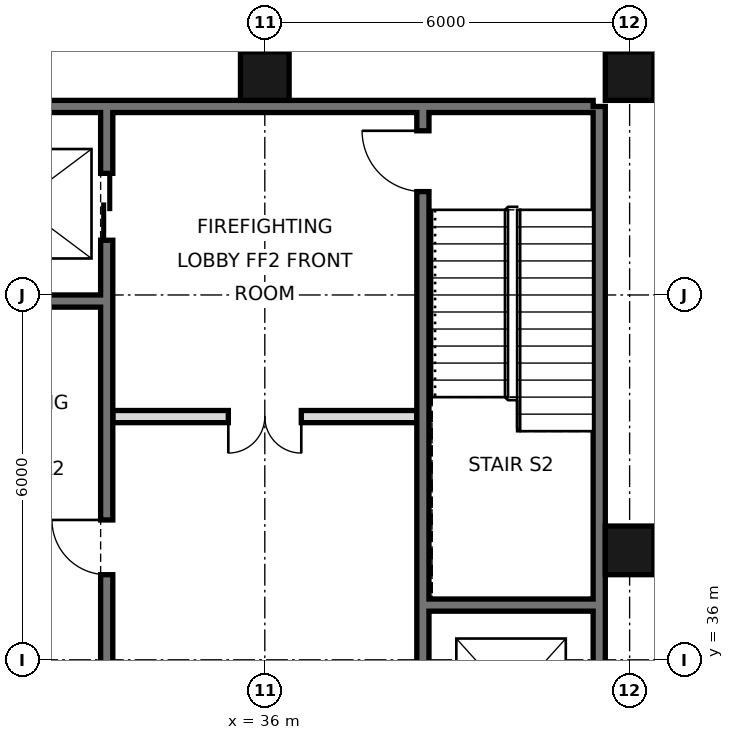
"""IFC4 building model, lengths in metres.
Left out: names, types, materials, properties, quantities, classifications, styles, units other than length and angle.
Written with IfcOpenShell. Run it as: python <this file> out.ifc"""

import sys

from ifc_helpers import new_model, si_unit, direction, frame, frame_2d, origin, origin_2d, place, context, subcontext, project, spatial, rectangle, hollow_rectangle, extrude, element, fill, save


model = new_model("IFC4")
c1 = context("Model", 3, precision=1e-05, world=origin(), true_north=direction((0.0, 1.0)))
c2 = subcontext(c1, "Body", "Model", "MODEL_VIEW")
j1 = project(units=[si_unit("LENGTHUNIT", "METRE"), si_unit("PLANEANGLEUNIT", "RADIAN")], contexts=[c1])
p1 = place(None, origin())
s1 = spatial("IfcSite", under=j1, at=p1, CompositionType="ELEMENT")
p2 = place(p1, origin())
s2 = spatial("IfcBuilding", under=s1, at=p2, CompositionType="ELEMENT")
p3 = place(p2, frame((0.0, 0.0, 229.8)))
s3 = spatial("IfcBuildingStorey", under=s2, at=p3, CompositionType="ELEMENT", Elevation=229.8)
for number, where, z_axis, x_axis in (
    (1, (36.0, 45.6, 0.0), (0.0, 0.0, 1.0), (1.0, 0.0, 0.0)),
    (2, (42.0, 37.8, 0.0), (0.0, 0.0, 1.0), (1.0, 0.0, 0.0)),
    (3, (42.0, 45.6, 0.0), (0.0, 0.0, 1.0), (1.0, 0.0, 0.0)),
):
    element("IfcColumn", number, at=place(p3, frame(where, z_axis=z_axis, x_axis=x_axis)), inside=s3, PredefinedType="COLUMN", context=c2, shape_type="SweptSolid", body=[
        extrude(hollow_rectangle(XDim=0.8, YDim=0.8, WallThickness=0.04, at=origin_2d()), origin(), (0.0, 0.0, 1.0), 4.4),
    ])
p4 = place(p3, frame((41.5, 21.6, 0.0), z_axis=(0.0, 0.0, 1.0), x_axis=(0.0, 1.0, 0.0)))
e4 = element("IfcWall", 4, at=p4, inside=s3, PredefinedType="SOLIDWALL", context=c2, shape_type="SweptSolid", body=[
    extrude(rectangle(XDim=23.5, YDim=0.2, at=frame_2d((11.75, 0.0))), origin(), (0.0, 0.0, 1.0), 4.1),
])
p5 = place(p3, frame((6.6, 45.1, 0.0), z_axis=(0.0, 0.0, 1.0), x_axis=(1.0, 0.0, 0.0)))
e5 = element("IfcWall", 5, at=p5, inside=s3, PredefinedType="SOLIDWALL", context=c2, shape_type="SweptSolid", body=[
    extrude(rectangle(XDim=34.8, YDim=0.2, at=frame_2d((17.4, 0.0))), origin(), (0.0, 0.0, 1.0), 4.1),
])
p6 = place(p3, frame((33.4, 27.5, 0.0), z_axis=(0.0, 0.0, 1.0), x_axis=(0.0, 1.0, 0.0)))
e6 = element("IfcWall", 6, at=p6, inside=s3, PredefinedType="SOLIDWALL", context=c2, shape_type="SweptSolid", body=[
    extrude(rectangle(XDim=17.5, YDim=0.2, at=frame_2d((8.75, 0.0))), origin(), (0.0, 0.0, 1.0), 4.1),
])
p7 = place(p6, frame((1.1, 0.0, 0.0)))
e7 = element("IfcOpeningElement", 7, at=p7, cuts=e6, PredefinedType="OPENING", context=c2, shape_type="SweptSolid", body=[
    extrude(rectangle(XDim=1.1, YDim=2.1, at=frame_2d((0.55, 1.05))), frame((0.0, 0.11, 0.0), z_axis=(0.0, -1.0, 0.0), x_axis=(1.0, 0.0, 0.0)), (0.0, 0.0, 1.0), 0.22),
])
p8 = place(p6, frame((4.2, 0.0, 0.0)))
e8 = element("IfcOpeningElement", 8, at=p8, cuts=e6, PredefinedType="OPENING", context=c2, shape_type="SweptSolid", body=[
    extrude(rectangle(XDim=1.1, YDim=2.1, at=frame_2d((0.55, 1.05))), frame((0.0, 0.11, 0.0), z_axis=(0.0, -1.0, 0.0), x_axis=(1.0, 0.0, 0.0)), (0.0, 0.0, 1.0), 0.22),
])
p9 = place(p6, frame((15.4, 0.0, 0.0)))
e9 = element("IfcOpeningElement", 9, at=p9, cuts=e6, PredefinedType="OPENING", context=c2, shape_type="SweptSolid", body=[
    extrude(rectangle(XDim=1.1, YDim=2.1, at=frame_2d((0.55, 1.05))), frame((0.0, 0.11, 0.0), z_axis=(0.0, -1.0, 0.0), x_axis=(1.0, 0.0, 0.0)), (0.0, 0.0, 1.0), 0.22),
])
p10 = place(p6, frame((9.9, 0.0, 0.0)))
e10 = element("IfcOpeningElement", 10, at=p10, cuts=e6, PredefinedType="OPENING", context=c2, shape_type="SweptSolid", body=[
    extrude(rectangle(XDim=0.9, YDim=2.1, at=frame_2d((0.45, 1.05))), frame((0.0, 0.11, 0.0), z_axis=(0.0, -1.0, 0.0), x_axis=(1.0, 0.0, 0.0)), (0.0, 0.0, 1.0), 0.22),
])
p11 = place(p3, frame((38.6, 21.6, 0.0), z_axis=(0.0, 0.0, 1.0), x_axis=(0.0, 1.0, 0.0)))
e11 = element("IfcWall", 11, at=p11, inside=s3, PredefinedType="SOLIDWALL", context=c2, shape_type="SweptSolid", body=[
    extrude(rectangle(XDim=23.4, YDim=0.2, at=frame_2d((11.7, 0.0))), origin(), (0.0, 0.0, 1.0), 4.1),
])
p12 = place(p11, frame((7.0, 0.0, 0.0)))
e12 = element("IfcOpeningElement", 12, at=p12, cuts=e11, PredefinedType="OPENING", context=c2, shape_type="SweptSolid", body=[
    extrude(rectangle(XDim=1.1, YDim=2.1, at=frame_2d((0.55, 1.05))), frame((0.0, 0.11, 0.0), z_axis=(0.0, -1.0, 0.0), x_axis=(1.0, 0.0, 0.0)), (0.0, 0.0, 1.0), 0.22),
])
p13 = place(p11, frame((10.1, 0.0, 0.0)))
e13 = element("IfcOpeningElement", 13, at=p13, cuts=e11, PredefinedType="OPENING", context=c2, shape_type="SweptSolid", body=[
    extrude(rectangle(XDim=1.1, YDim=2.1, at=frame_2d((0.55, 1.05))), frame((0.0, 0.11, 0.0), z_axis=(0.0, -1.0, 0.0), x_axis=(1.0, 0.0, 0.0)), (0.0, 0.0, 1.0), 0.22),
])
p14 = place(p11, frame((13.2, 0.0, 0.0)))
e14 = element("IfcOpeningElement", 14, at=p14, cuts=e11, PredefinedType="OPENING", context=c2, shape_type="SweptSolid", body=[
    extrude(rectangle(XDim=1.1, YDim=2.1, at=frame_2d((0.55, 1.05))), frame((0.0, 0.11, 0.0), z_axis=(0.0, -1.0, 0.0), x_axis=(1.0, 0.0, 0.0)), (0.0, 0.0, 1.0), 0.22),
])
p15 = place(p11, frame((22.1, 0.0, 0.0)))
e15 = element("IfcOpeningElement", 15, at=p15, cuts=e11, PredefinedType="OPENING", context=c2, shape_type="SweptSolid", body=[
    extrude(rectangle(XDim=1.0, YDim=2.1, at=frame_2d((0.5, 1.05))), frame((0.0, 0.11, 0.0), z_axis=(0.0, -1.0, 0.0), x_axis=(1.0, 0.0, 0.0)), (0.0, 0.0, 1.0), 0.22),
])
p16 = place(p11, frame((0.175, 0.0, 0.0)))
e16 = element("IfcOpeningElement", 16, at=p16, cuts=e11, PredefinedType="OPENING", context=c2, shape_type="SweptSolid", body=[
    extrude(rectangle(XDim=0.9, YDim=2.1, at=frame_2d((0.45, 1.05))), frame((0.0, 0.11, 0.0), z_axis=(0.0, -1.0, 0.0), x_axis=(1.0, 0.0, 0.0)), (0.0, 0.0, 1.0), 0.22),
])
p17 = place(p3, frame((38.7, 36.9, 0.0), z_axis=(0.0, 0.0, 1.0), x_axis=(1.0, 0.0, 0.0)))
e17 = element("IfcWall", 17, at=p17, inside=s3, PredefinedType="SOLIDWALL", context=c2, shape_type="SweptSolid", body=[
    extrude(rectangle(XDim=2.7, YDim=0.2, at=frame_2d((1.35, 0.0))), origin(), (0.0, 0.0, 1.0), 4.1),
])
p18 = place(p3, frame((33.5, 40.0, 0.0), z_axis=(0.0, 0.0, 1.0), x_axis=(1.0, 0.0, 0.0)))
e18 = element("IfcWall", 18, at=p18, inside=s3, PredefinedType="PARTITIONING", context=c2, shape_type="SweptSolid", body=[
    extrude(rectangle(XDim=5.0, YDim=0.2, at=frame_2d((2.5, 0.0))), origin(), (0.0, 0.0, 1.0), 4.1),
])
p19 = place(p18, frame((1.9, 0.0, 0.0)))
e19 = element("IfcOpeningElement", 19, at=p19, cuts=e18, PredefinedType="OPENING", context=c2, shape_type="SweptSolid", body=[
    extrude(rectangle(XDim=1.2, YDim=2.1, at=frame_2d((0.6, 1.05))), frame((0.0, 0.11, 0.0), z_axis=(0.0, -1.0, 0.0), x_axis=(1.0, 0.0, 0.0)), (0.0, 0.0, 1.0), 0.22),
])
p20 = place(p3, frame((30.6, 41.9, 0.0), z_axis=(0.0, 0.0, 1.0), x_axis=(1.0, 0.0, 0.0)))
e20 = element("IfcWall", 20, at=p20, inside=s3, PredefinedType="SOLIDWALL", context=c2, shape_type="SweptSolid", body=[
    extrude(rectangle(XDim=2.7, YDim=0.2, at=frame_2d((1.35, 0.0))), origin(), (0.0, 0.0, 1.0), 4.1),
])
p21 = place(p19, frame((1.2, 0.0, 0.0), z_axis=(0.0, 0.0, 1.0), x_axis=(-1.0, 0.0, 0.0)))
e21 = element("IfcDoor", 21, at=p21, inside=s3, OperationType="DOUBLE_DOOR_SINGLE_SWING", PredefinedType="DOOR", context=c2, shape_type="SweptSolid", body=[
    extrude(rectangle(XDim=1.2, YDim=2.1, at=frame_2d((0.6, 1.05))), frame((0.0, 0.025, 0.0), z_axis=(0.0, -1.0, 0.0), x_axis=(1.0, 0.0, 0.0)), (0.0, 0.0, 1.0), 0.05),
])
fill(e19, e21)
p22 = place(p9, origin())
e22 = element("IfcDoor", 22, at=p22, inside=s3, OperationType="DOUBLE_DOOR_SLIDING", PredefinedType="DOOR", context=c2, shape_type="SweptSolid", body=[
    extrude(rectangle(XDim=1.1, YDim=2.1, at=frame_2d((0.55, 1.05))), frame((0.0, 0.025, 0.0), z_axis=(0.0, -1.0, 0.0), x_axis=(1.0, 0.0, 0.0)), (0.0, 0.0, 1.0), 0.05),
])
fill(e9, e22)
p23 = place(p15, frame((1.0, 0.0, 0.0), z_axis=(0.0, 0.0, 1.0), x_axis=(-1.0, 0.0, 0.0)))
e23 = element("IfcDoor", 23, at=p23, inside=s3, OperationType="SINGLE_SWING_LEFT", PredefinedType="DOOR", context=c2, shape_type="SweptSolid", body=[
    extrude(rectangle(XDim=1.0, YDim=2.1, at=frame_2d((0.5, 1.05))), frame((0.0, 0.025, 0.0), z_axis=(0.0, -1.0, 0.0), x_axis=(1.0, 0.0, 0.0)), (0.0, 0.0, 1.0), 0.05),
])
fill(e15, e23)
p24 = place(p10, frame((0.9, 0.0, 0.0), z_axis=(0.0, 0.0, 1.0), x_axis=(-1.0, 0.0, 0.0)))
e24 = element("IfcDoor", 24, at=p24, inside=s3, OperationType="SINGLE_SWING_LEFT", PredefinedType="DOOR", context=c2, shape_type="SweptSolid", body=[
    extrude(rectangle(XDim=0.9, YDim=2.1, at=frame_2d((0.45, 1.05))), frame((0.0, 0.025, 0.0), z_axis=(0.0, -1.0, 0.0), x_axis=(1.0, 0.0, 0.0)), (0.0, 0.0, 1.0), 0.05),
])
fill(e10, e24)
save(model, sys.argv[1])
